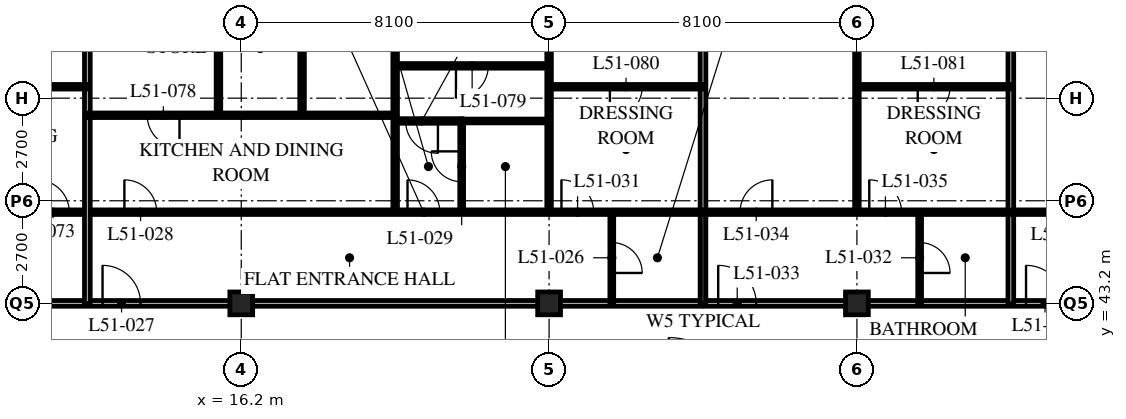
"""IFC4 building model, lengths in metres.
Left out: names, types, materials, properties, quantities, classifications, styles, units other than length and angle.
Written with IfcOpenShell. Run it as: python <this file> out.ifc"""

import sys

from ifc_helpers import new_model, si_unit, direction, frame, frame_2d, origin, origin_2d, place, context, subcontext, project, spatial, rectangle, hollow_rectangle, extrude, element, fill, save


model = new_model("IFC4")
c1 = context("Model", 3, precision=1e-05, world=origin(), true_north=direction((0.0, 1.0)))
c2 = subcontext(c1, "Body", "Model", "MODEL_VIEW")
j1 = project(units=[si_unit("LENGTHUNIT", "METRE"), si_unit("PLANEANGLEUNIT", "RADIAN")], contexts=[c1])
p1 = place(None, origin())
s1 = spatial("IfcSite", under=j1, at=p1, CompositionType="ELEMENT")
p2 = place(p1, origin())
s2 = spatial("IfcBuilding", under=s1, at=p2, CompositionType="ELEMENT")
p3 = place(p2, frame((0.0, 0.0, 199.2)))
s3 = spatial("IfcBuildingStorey", under=s2, at=p3, CompositionType="ELEMENT", Elevation=199.2)
for number, where, z_axis, x_axis in (
    (1, (16.2, 43.2, 0.0), (0.0, 0.0, 1.0), (1.0, 0.0, 0.0)),
    (2, (24.3, 43.2, 0.0), (0.0, 0.0, 1.0), (1.0, 0.0, 0.0)),
    (3, (32.4, 43.2, 0.0), (0.0, 0.0, 1.0), (1.0, 0.0, 0.0)),
):
    element("IfcColumn", number, at=place(p3, frame(where, z_axis=z_axis, x_axis=x_axis)), inside=s3, PredefinedType="COLUMN", context=c2, shape_type="SweptSolid", body=[
        extrude(hollow_rectangle(XDim=0.6, YDim=0.6, WallThickness=0.05, at=origin_2d()), origin(), (0.0, 0.0, 1.0), 3.6),
    ])
p4 = place(p3, frame((8.1, 43.2, 0.0), z_axis=(0.0, 0.0, 1.0), x_axis=(1.0, 0.0, 0.0)))
e4 = element("IfcWall", 4, at=p4, inside=s3, PredefinedType="PARTITIONING", context=c2, shape_type="SweptSolid", body=[
    extrude(rectangle(XDim=40.5, YDim=0.15, at=frame_2d((20.25, 0.0))), origin(), (0.0, 0.0, 1.0), 2.778),
])
p5 = place(p4, frame((4.45, 0.0, 0.0)))
e5 = element("IfcOpeningElement", 5, at=p5, cuts=e4, PredefinedType="OPENING", context=c2, shape_type="SweptSolid", body=[
    extrude(rectangle(XDim=1.0, YDim=2.1, at=frame_2d((0.5, 1.05))), frame((0.0, 0.085, 0.0), z_axis=(0.0, -1.0, 0.0), x_axis=(1.0, 0.0, 0.0)), (0.0, 0.0, 1.0), 0.17),
])
p6 = place(p4, frame((20.65, 0.0, 0.0)))
e6 = element("IfcOpeningElement", 6, at=p6, cuts=e4, PredefinedType="OPENING", context=c2, shape_type="SweptSolid", body=[
    extrude(rectangle(XDim=1.0, YDim=2.1, at=frame_2d((0.5, 1.05))), frame((0.0, 0.085, 0.0), z_axis=(0.0, -1.0, 0.0), x_axis=(1.0, 0.0, 0.0)), (0.0, 0.0, 1.0), 0.17),
])
p7 = place(p4, frame((28.75, 0.0, 0.0)))
e7 = element("IfcOpeningElement", 7, at=p7, cuts=e4, PredefinedType="OPENING", context=c2, shape_type="SweptSolid", body=[
    extrude(rectangle(XDim=1.0, YDim=2.1, at=frame_2d((0.5, 1.05))), frame((0.0, 0.085, 0.0), z_axis=(0.0, -1.0, 0.0), x_axis=(1.0, 0.0, 0.0)), (0.0, 0.0, 1.0), 0.17),
])
p8 = place(p4, frame((37.975, 0.0, 0.0)))
e8 = element("IfcOpeningElement", 8, at=p8, cuts=e4, PredefinedType="OPENING", context=c2, shape_type="SweptSolid", body=[
    extrude(rectangle(XDim=1.0, YDim=2.1, at=frame_2d((0.5, 1.05))), frame((0.0, 0.085, 0.0), z_axis=(0.0, -1.0, 0.0), x_axis=(1.0, 0.0, 0.0)), (0.0, 0.0, 1.0), 0.17),
])
p9 = place(p4, frame((1.525, 0.0, 0.0)))
e9 = element("IfcOpeningElement", 9, at=p9, cuts=e4, PredefinedType="OPENING", context=c2, shape_type="SweptSolid", body=[
    extrude(rectangle(XDim=1.0, YDim=2.1, at=frame_2d((0.5, 1.05))), frame((0.0, 0.085, 0.0), z_axis=(0.0, -1.0, 0.0), x_axis=(1.0, 0.0, 0.0)), (0.0, 0.0, 1.0), 0.17),
])
p10 = place(p3, frame((25.95, 43.2, 0.0), z_axis=(0.0, 0.0, 1.0), x_axis=(0.0, 1.0, 0.0)))
e10 = element("IfcWall", 10, at=p10, inside=s3, PredefinedType="PARTITIONING", context=c2, shape_type="SweptSolid", body=[
    extrude(rectangle(XDim=2.4, YDim=0.1, at=frame_2d((1.2, 0.0))), origin(), (0.0, 0.0, 1.0), 3.39),
])
p11 = place(p10, frame((0.8, 0.0, 0.0)))
e11 = element("IfcOpeningElement", 11, at=p11, cuts=e10, PredefinedType="OPENING", context=c2, shape_type="SweptSolid", body=[
    extrude(rectangle(XDim=0.8, YDim=2.1, at=frame_2d((0.4, 1.05))), frame((0.0, 0.06, 0.0), z_axis=(0.0, -1.0, 0.0), x_axis=(1.0, 0.0, 0.0)), (0.0, 0.0, 1.0), 0.12),
])
p12 = place(p3, frame((22.0, 45.6, 0.0), z_axis=(0.0, 0.0, 1.0), x_axis=(0.0, 1.0, 0.0)))
e12 = element("IfcWall", 12, at=p12, inside=s3, PredefinedType="PARTITIONING", context=c2, shape_type="SweptSolid", body=[
    extrude(rectangle(XDim=2.4, YDim=0.1, at=frame_2d((1.2, 0.0))), origin(), (0.0, 0.0, 1.0), 3.39),
])
p13 = place(p12, frame((0.8, 0.0, 0.0)))
e13 = element("IfcOpeningElement", 13, at=p13, cuts=e12, PredefinedType="OPENING", context=c2, shape_type="SweptSolid", body=[
    extrude(rectangle(XDim=0.8, YDim=2.1, at=frame_2d((0.4, 1.05))), frame((0.0, 0.06, 0.0), z_axis=(0.0, -1.0, 0.0), x_axis=(1.0, 0.0, 0.0)), (0.0, 0.0, 1.0), 0.12),
])
p14 = place(p3, frame((22.0, 48.0, 0.0), z_axis=(0.0, 0.0, 1.0), x_axis=(1.0, 0.0, 0.0)))
e14 = element("IfcWall", 14, at=p14, inside=s3, PredefinedType="PARTITIONING", context=c2, shape_type="SweptSolid", body=[
    extrude(rectangle(XDim=2.3, YDim=0.1, at=frame_2d((1.15, 0.0))), origin(), (0.0, 0.0, 1.0), 3.39),
])
p15 = place(p3, frame((20.25, 45.6, 0.0), z_axis=(0.0, 0.0, 1.0), x_axis=(0.0, 1.0, 0.0)))
e15 = element("IfcWall", 15, at=p15, inside=s3, PredefinedType="PARTITIONING", context=c2, shape_type="SweptSolid", body=[
    extrude(rectangle(XDim=13.5, YDim=0.12, at=frame_2d((6.75, 0.0))), origin(), (0.0, 0.0, 1.0), 3.39),
])
p16 = place(p3, frame((24.3, 45.6, 0.0), z_axis=(0.0, 0.0, 1.0), x_axis=(0.0, 1.0, 0.0)))
e16 = element("IfcWall", 16, at=p16, inside=s3, PredefinedType="PARTITIONING", context=c2, shape_type="SweptSolid", body=[
    extrude(rectangle(XDim=13.5, YDim=0.12, at=frame_2d((6.75, 0.0))), origin(), (0.0, 0.0, 1.0), 2.778),
])
p17 = place(p3, frame((28.35, 43.2, 0.0), z_axis=(0.0, 0.0, 1.0), x_axis=(0.0, 1.0, 0.0)))
e17 = element("IfcWall", 17, at=p17, inside=s3, PredefinedType="PARTITIONING", context=c2, shape_type="SweptSolid", body=[
    extrude(rectangle(XDim=15.9, YDim=0.15, at=frame_2d((7.95, 0.0))), origin(), (0.0, 0.0, 1.0), 3.39),
])
p18 = place(p3, frame((34.05, 43.2, 0.0), z_axis=(0.0, 0.0, 1.0), x_axis=(0.0, 1.0, 0.0)))
e18 = element("IfcWall", 18, at=p18, inside=s3, PredefinedType="PARTITIONING", context=c2, shape_type="SweptSolid", body=[
    extrude(rectangle(XDim=2.4, YDim=0.1, at=frame_2d((1.2, 0.0))), origin(), (0.0, 0.0, 1.0), 3.39),
])
p19 = place(p18, frame((0.8, 0.0, 0.0)))
e19 = element("IfcOpeningElement", 19, at=p19, cuts=e18, PredefinedType="OPENING", context=c2, shape_type="SweptSolid", body=[
    extrude(rectangle(XDim=0.8, YDim=2.1, at=frame_2d((0.4, 1.05))), frame((0.0, 0.06, 0.0), z_axis=(0.0, -1.0, 0.0), x_axis=(1.0, 0.0, 0.0)), (0.0, 0.0, 1.0), 0.12),
])
p20 = place(p3, frame((32.4, 45.6, 0.0), z_axis=(0.0, 0.0, 1.0), x_axis=(0.0, 1.0, 0.0)))
e20 = element("IfcWall", 20, at=p20, inside=s3, PredefinedType="PARTITIONING", context=c2, shape_type="SweptSolid", body=[
    extrude(rectangle(XDim=13.5, YDim=0.12, at=frame_2d((6.75, 0.0))), origin(), (0.0, 0.0, 1.0), 2.778),
])
p21 = place(p3, frame((36.45, 43.2, 0.0), z_axis=(0.0, 0.0, 1.0), x_axis=(0.0, 1.0, 0.0)))
e21 = element("IfcWall", 21, at=p21, inside=s3, PredefinedType="PARTITIONING", context=c2, shape_type="SweptSolid", body=[
    extrude(rectangle(XDim=15.9, YDim=0.15, at=frame_2d((7.95, 0.0))), origin(), (0.0, 0.0, 1.0), 3.39),
])
p22 = place(p3, frame((4.1, 45.6, 0.0), z_axis=(0.0, 0.0, 1.0), x_axis=(1.0, 0.0, 0.0)))
e22 = element("IfcWall", 22, at=p22, inside=s3, PredefinedType="PARTITIONING", context=c2, shape_type="SweptSolid", body=[
    extrude(rectangle(XDim=48.5, YDim=0.12, at=frame_2d((24.25, 0.0))), origin(), (0.0, 0.0, 1.0), 3.39),
])
p23 = place(p22, frame((9.025, 0.0, 0.0)))
e23 = element("IfcOpeningElement", 23, at=p23, cuts=e22, PredefinedType="OPENING", context=c2, shape_type="SweptSolid", body=[
    extrude(rectangle(XDim=0.85, YDim=2.1, at=frame_2d((0.425, 1.05))), frame((0.0, 0.07, 0.0), z_axis=(0.0, -1.0, 0.0), x_axis=(1.0, 0.0, 0.0)), (0.0, 0.0, 1.0), 0.14),
])
p24 = place(p22, frame((16.475, 0.0, 0.0)))
e24 = element("IfcOpeningElement", 24, at=p24, cuts=e22, PredefinedType="OPENING", context=c2, shape_type="SweptSolid", body=[
    extrude(rectangle(XDim=0.85, YDim=2.1, at=frame_2d((0.425, 1.05))), frame((0.0, 0.07, 0.0), z_axis=(0.0, -1.0, 0.0), x_axis=(1.0, 0.0, 0.0)), (0.0, 0.0, 1.0), 0.14),
])
p25 = place(p22, frame((20.525, 0.0, 0.0)))
e25 = element("IfcOpeningElement", 25, at=p25, cuts=e22, PredefinedType="OPENING", context=c2, shape_type="SweptSolid", body=[
    extrude(rectangle(XDim=0.85, YDim=2.1, at=frame_2d((0.425, 1.05))), frame((0.0, 0.07, 0.0), z_axis=(0.0, -1.0, 0.0), x_axis=(1.0, 0.0, 0.0)), (0.0, 0.0, 1.0), 0.14),
])
p26 = place(p22, frame((25.225, 0.0, 0.0)))
e26 = element("IfcOpeningElement", 26, at=p26, cuts=e22, PredefinedType="OPENING", context=c2, shape_type="SweptSolid", body=[
    extrude(rectangle(XDim=0.85, YDim=2.1, at=frame_2d((0.425, 1.05))), frame((0.0, 0.07, 0.0), z_axis=(0.0, -1.0, 0.0), x_axis=(1.0, 0.0, 0.0)), (0.0, 0.0, 1.0), 0.14),
])
p27 = place(p22, frame((28.625, 0.0, 0.0)))
e27 = element("IfcOpeningElement", 27, at=p27, cuts=e22, PredefinedType="OPENING", context=c2, shape_type="SweptSolid", body=[
    extrude(rectangle(XDim=0.85, YDim=2.1, at=frame_2d((0.425, 1.05))), frame((0.0, 0.07, 0.0), z_axis=(0.0, -1.0, 0.0), x_axis=(1.0, 0.0, 0.0)), (0.0, 0.0, 1.0), 0.14),
])
p28 = place(p22, frame((33.325, 0.0, 0.0)))
e28 = element("IfcOpeningElement", 28, at=p28, cuts=e22, PredefinedType="OPENING", context=c2, shape_type="SweptSolid", body=[
    extrude(rectangle(XDim=0.85, YDim=2.1, at=frame_2d((0.425, 1.05))), frame((0.0, 0.07, 0.0), z_axis=(0.0, -1.0, 0.0), x_axis=(1.0, 0.0, 0.0)), (0.0, 0.0, 1.0), 0.14),
])
p29 = place(p22, frame((36.725, 0.0, 0.0)))
e29 = element("IfcOpeningElement", 29, at=p29, cuts=e22, PredefinedType="OPENING", context=c2, shape_type="SweptSolid", body=[
    extrude(rectangle(XDim=0.85, YDim=2.1, at=frame_2d((0.425, 1.05))), frame((0.0, 0.07, 0.0), z_axis=(0.0, -1.0, 0.0), x_axis=(1.0, 0.0, 0.0)), (0.0, 0.0, 1.0), 0.14),
])
p30 = place(p22, frame((40.925, 0.0, 0.0)))
e30 = element("IfcOpeningElement", 30, at=p30, cuts=e22, PredefinedType="OPENING", context=c2, shape_type="SweptSolid", body=[
    extrude(rectangle(XDim=0.85, YDim=2.1, at=frame_2d((0.425, 1.05))), frame((0.0, 0.07, 0.0), z_axis=(0.0, -1.0, 0.0), x_axis=(1.0, 0.0, 0.0)), (0.0, 0.0, 1.0), 0.14),
])
p31 = place(p22, frame((44.775, 0.0, 0.0)))
e31 = element("IfcOpeningElement", 31, at=p31, cuts=e22, PredefinedType="OPENING", context=c2, shape_type="SweptSolid", body=[
    extrude(rectangle(XDim=0.85, YDim=2.1, at=frame_2d((0.425, 1.05))), frame((0.0, 0.07, 0.0), z_axis=(0.0, -1.0, 0.0), x_axis=(1.0, 0.0, 0.0)), (0.0, 0.0, 1.0), 0.14),
])
p32 = place(p22, frame((6.725, 0.0, 0.0)))
e32 = element("IfcOpeningElement", 32, at=p32, cuts=e22, PredefinedType="OPENING", context=c2, shape_type="SweptSolid", body=[
    extrude(rectangle(XDim=0.85, YDim=2.1, at=frame_2d((0.425, 1.05))), frame((0.0, 0.07, 0.0), z_axis=(0.0, -1.0, 0.0), x_axis=(1.0, 0.0, 0.0)), (0.0, 0.0, 1.0), 0.14),
])
p33 = place(p22, frame((2.875, 0.0, 0.0)))
e33 = element("IfcOpeningElement", 33, at=p33, cuts=e22, PredefinedType="OPENING", context=c2, shape_type="SweptSolid", body=[
    extrude(rectangle(XDim=0.85, YDim=2.1, at=frame_2d((0.425, 1.05))), frame((0.0, 0.07, 0.0), z_axis=(0.0, -1.0, 0.0), x_axis=(1.0, 0.0, 0.0)), (0.0, 0.0, 1.0), 0.14),
])
p34 = place(p3, frame((12.15, 43.2, 0.0), z_axis=(0.0, 0.0, 1.0), x_axis=(0.0, 1.0, 0.0)))
e34 = element("IfcWall", 34, at=p34, inside=s3, PredefinedType="PARTITIONING", context=c2, shape_type="SweptSolid", body=[
    extrude(rectangle(XDim=15.9, YDim=0.15, at=frame_2d((7.95, 0.0))), origin(), (0.0, 0.0, 1.0), 3.39),
])
p35 = place(p3, frame((20.25, 48.0, 0.0), z_axis=(0.0, 0.0, 1.0), x_axis=(1.0, 0.0, 0.0)))
e35 = element("IfcWall", 35, at=p35, inside=s3, PredefinedType="PARTITIONING", context=c2, shape_type="SweptSolid", body=[
    extrude(rectangle(XDim=1.76, YDim=0.12, at=frame_2d((0.88, 0.0))), origin(), (0.0, 0.0, 1.0), 3.39),
])
p36 = place(p35, frame((0.275, 0.0, 0.0)))
e36 = element("IfcOpeningElement", 36, at=p36, cuts=e35, PredefinedType="OPENING", context=c2, shape_type="SweptSolid", body=[
    extrude(rectangle(XDim=0.85, YDim=2.1, at=frame_2d((0.425, 1.05))), frame((0.0, 0.07, 0.0), z_axis=(0.0, -1.0, 0.0), x_axis=(1.0, 0.0, 0.0)), (0.0, 0.0, 1.0), 0.14),
])
p37 = place(p3, frame((12.15, 48.15, 0.0), z_axis=(0.0, 0.0, 1.0), x_axis=(1.0, 0.0, 0.0)))
e37 = element("IfcWall", 37, at=p37, inside=s3, PredefinedType="PARTITIONING", context=c2, shape_type="SweptSolid", body=[
    extrude(rectangle(XDim=8.1, YDim=0.12, at=frame_2d((4.05, 0.0))), origin(), (0.0, 0.0, 1.0), 3.39),
])
p38 = place(p37, frame((1.575, 0.0, 0.0)))
e38 = element("IfcOpeningElement", 38, at=p38, cuts=e37, PredefinedType="OPENING", context=c2, shape_type="SweptSolid", body=[
    extrude(rectangle(XDim=0.85, YDim=2.1, at=frame_2d((0.425, 1.05))), frame((0.0, 0.07, 0.0), z_axis=(0.0, -1.0, 0.0), x_axis=(1.0, 0.0, 0.0)), (0.0, 0.0, 1.0), 0.14),
])
p39 = place(p3, frame((20.25, 49.45, 0.0), z_axis=(0.0, 0.0, 1.0), x_axis=(1.0, 0.0, 0.0)))
e39 = element("IfcWall", 39, at=p39, inside=s3, PredefinedType="PARTITIONING", context=c2, shape_type="SweptSolid", body=[
    extrude(rectangle(XDim=4.05, YDim=0.12, at=frame_2d((2.025, 0.0))), origin(), (0.0, 0.0, 1.0), 3.39),
])
p40 = place(p39, frame((1.6, 0.0, 0.0)))
e40 = element("IfcOpeningElement", 40, at=p40, cuts=e39, PredefinedType="OPENING", context=c2, shape_type="SweptSolid", body=[
    extrude(rectangle(XDim=0.85, YDim=2.1, at=frame_2d((0.425, 1.05))), frame((0.0, 0.07, 0.0), z_axis=(0.0, -1.0, 0.0), x_axis=(1.0, 0.0, 0.0)), (0.0, 0.0, 1.0), 0.14),
])
p41 = place(p3, frame((24.3, 48.9, 0.0), z_axis=(0.0, 0.0, 1.0), x_axis=(1.0, 0.0, 0.0)))
e41 = element("IfcWall", 41, at=p41, inside=s3, PredefinedType="PARTITIONING", context=c2, shape_type="SweptSolid", body=[
    extrude(rectangle(XDim=4.05, YDim=0.12, at=frame_2d((2.025, 0.0))), origin(), (0.0, 0.0, 1.0), 3.39),
])
p42 = place(p41, frame((1.6, 0.0, 0.0)))
e42 = element("IfcOpeningElement", 42, at=p42, cuts=e41, PredefinedType="OPENING", context=c2, shape_type="SweptSolid", body=[
    extrude(rectangle(XDim=0.85, YDim=2.1, at=frame_2d((0.425, 1.05))), frame((0.0, 0.07, 0.0), z_axis=(0.0, -1.0, 0.0), x_axis=(1.0, 0.0, 0.0)), (0.0, 0.0, 1.0), 0.14),
])
p43 = place(p3, frame((32.4, 48.9, 0.0), z_axis=(0.0, 0.0, 1.0), x_axis=(1.0, 0.0, 0.0)))
e43 = element("IfcWall", 43, at=p43, inside=s3, PredefinedType="PARTITIONING", context=c2, shape_type="SweptSolid", body=[
    extrude(rectangle(XDim=4.05, YDim=0.12, at=frame_2d((2.025, 0.0))), origin(), (0.0, 0.0, 1.0), 3.39),
])
p44 = place(p43, frame((1.6, 0.0, 0.0)))
e44 = element("IfcOpeningElement", 44, at=p44, cuts=e43, PredefinedType="OPENING", context=c2, shape_type="SweptSolid", body=[
    extrude(rectangle(XDim=0.85, YDim=2.1, at=frame_2d((0.425, 1.05))), frame((0.0, 0.07, 0.0), z_axis=(0.0, -1.0, 0.0), x_axis=(1.0, 0.0, 0.0)), (0.0, 0.0, 1.0), 0.14),
])
p45 = place(p3, frame((8.1, 48.9, 0.0), z_axis=(0.0, 0.0, 1.0), x_axis=(1.0, 0.0, 0.0)))
e45 = element("IfcWall", 45, at=p45, inside=s3, PredefinedType="PARTITIONING", context=c2, shape_type="SweptSolid", body=[
    extrude(rectangle(XDim=4.05, YDim=0.12, at=frame_2d((2.025, 0.0))), origin(), (0.0, 0.0, 1.0), 3.39),
])
p46 = place(p45, frame((1.6, 0.0, 0.0)))
e46 = element("IfcOpeningElement", 46, at=p46, cuts=e45, PredefinedType="OPENING", context=c2, shape_type="SweptSolid", body=[
    extrude(rectangle(XDim=0.85, YDim=2.1, at=frame_2d((0.425, 1.05))), frame((0.0, 0.07, 0.0), z_axis=(0.0, -1.0, 0.0), x_axis=(1.0, 0.0, 0.0)), (0.0, 0.0, 1.0), 0.14),
])
for number, where, z_axis, x_axis in (
    (47, (15.6, 48.15, 0.0), (0.0, 0.0, 1.0), (0.0, 1.0, 0.0)),
    (48, (17.8, 48.15, 0.0), (0.0, 0.0, 1.0), (0.0, 1.0, 0.0)),
):
    element("IfcWall", number, at=place(p3, frame(where, z_axis=z_axis, x_axis=x_axis)), inside=s3, PredefinedType="PARTITIONING", context=c2, shape_type="SweptSolid", body=[
        extrude(rectangle(XDim=3.51, YDim=0.12, at=frame_2d((1.755, 0.0))), origin(), (0.0, 0.0, 1.0), 3.39),
    ])
p47 = place(p11, origin())
e49 = element("IfcDoor", 49, at=p47, inside=s3, OperationType="SINGLE_SWING_RIGHT", PredefinedType="DOOR", context=c2, shape_type="SweptSolid", body=[
    extrude(rectangle(XDim=0.8, YDim=2.1, at=frame_2d((0.4, 1.05))), frame((0.0, 0.025, 0.0), z_axis=(0.0, -1.0, 0.0), x_axis=(1.0, 0.0, 0.0)), (0.0, 0.0, 1.0), 0.05),
])
fill(e11, e49)
p48 = place(p5, origin())
e50 = element("IfcDoor", 50, at=p48, inside=s3, OperationType="SINGLE_SWING_LEFT", PredefinedType="DOOR", context=c2, shape_type="SweptSolid", body=[
    extrude(rectangle(XDim=1.0, YDim=2.1, at=frame_2d((0.5, 1.05))), frame((0.0, 0.025, 0.0), z_axis=(0.0, -1.0, 0.0), x_axis=(1.0, 0.0, 0.0)), (0.0, 0.0, 1.0), 0.05),
])
fill(e5, e50)
p49 = place(p23, origin())
e51 = element("IfcDoor", 51, at=p49, inside=s3, OperationType="SINGLE_SWING_LEFT", PredefinedType="DOOR", context=c2, shape_type="SweptSolid", body=[
    extrude(rectangle(XDim=0.85, YDim=2.1, at=frame_2d((0.425, 1.05))), frame((0.0, 0.025, 0.0), z_axis=(0.0, -1.0, 0.0), x_axis=(1.0, 0.0, 0.0)), (0.0, 0.0, 1.0), 0.05),
])
fill(e23, e51)
p50 = place(p13, origin())
e52 = element("IfcDoor", 52, at=p50, inside=s3, OperationType="SINGLE_SWING_RIGHT", PredefinedType="DOOR", context=c2, shape_type="SweptSolid", body=[
    extrude(rectangle(XDim=0.8, YDim=2.1, at=frame_2d((0.4, 1.05))), frame((0.0, 0.025, 0.0), z_axis=(0.0, -1.0, 0.0), x_axis=(1.0, 0.0, 0.0)), (0.0, 0.0, 1.0), 0.05),
])
fill(e13, e52)
p51 = place(p24, origin())
e53 = element("IfcDoor", 53, at=p51, inside=s3, OperationType="SINGLE_SWING_LEFT", PredefinedType="DOOR", context=c2, shape_type="SweptSolid", body=[
    extrude(rectangle(XDim=0.85, YDim=2.1, at=frame_2d((0.425, 1.05))), frame((0.0, 0.025, 0.0), z_axis=(0.0, -1.0, 0.0), x_axis=(1.0, 0.0, 0.0)), (0.0, 0.0, 1.0), 0.05),
])
fill(e24, e53)
p52 = place(p25, origin())
e54 = element("IfcDoor", 54, at=p52, inside=s3, OperationType="SINGLE_SWING_LEFT", PredefinedType="DOOR", context=c2, shape_type="SweptSolid", body=[
    extrude(rectangle(XDim=0.85, YDim=2.1, at=frame_2d((0.425, 1.05))), frame((0.0, 0.025, 0.0), z_axis=(0.0, -1.0, 0.0), x_axis=(1.0, 0.0, 0.0)), (0.0, 0.0, 1.0), 0.05),
])
fill(e25, e54)
p53 = place(p19, origin())
e55 = element("IfcDoor", 55, at=p53, inside=s3, OperationType="SINGLE_SWING_RIGHT", PredefinedType="DOOR", context=c2, shape_type="SweptSolid", body=[
    extrude(rectangle(XDim=0.8, YDim=2.1, at=frame_2d((0.4, 1.05))), frame((0.0, 0.025, 0.0), z_axis=(0.0, -1.0, 0.0), x_axis=(1.0, 0.0, 0.0)), (0.0, 0.0, 1.0), 0.05),
])
fill(e19, e55)
p54 = place(p6, origin())
e56 = element("IfcDoor", 56, at=p54, inside=s3, OperationType="SINGLE_SWING_LEFT", PredefinedType="DOOR", context=c2, shape_type="SweptSolid", body=[
    extrude(rectangle(XDim=1.0, YDim=2.1, at=frame_2d((0.5, 1.05))), frame((0.0, 0.025, 0.0), z_axis=(0.0, -1.0, 0.0), x_axis=(1.0, 0.0, 0.0)), (0.0, 0.0, 1.0), 0.05),
])
fill(e6, e56)
p55 = place(p26, origin())
e57 = element("IfcDoor", 57, at=p55, inside=s3, OperationType="SINGLE_SWING_RIGHT", PredefinedType="DOOR", context=c2, shape_type="SweptSolid", body=[
    extrude(rectangle(XDim=0.85, YDim=2.1, at=frame_2d((0.425, 1.05))), frame((0.0, 0.025, 0.0), z_axis=(0.0, -1.0, 0.0), x_axis=(1.0, 0.0, 0.0)), (0.0, 0.0, 1.0), 0.05),
])
fill(e26, e57)
p56 = place(p27, origin())
e58 = element("IfcDoor", 58, at=p56, inside=s3, OperationType="SINGLE_SWING_LEFT", PredefinedType="DOOR", context=c2, shape_type="SweptSolid", body=[
    extrude(rectangle(XDim=0.85, YDim=2.1, at=frame_2d((0.425, 1.05))), frame((0.0, 0.025, 0.0), z_axis=(0.0, -1.0, 0.0), x_axis=(1.0, 0.0, 0.0)), (0.0, 0.0, 1.0), 0.05),
])
fill(e27, e58)
p57 = place(p7, origin())
e59 = element("IfcDoor", 59, at=p57, inside=s3, OperationType="SINGLE_SWING_LEFT", PredefinedType="DOOR", context=c2, shape_type="SweptSolid", body=[
    extrude(rectangle(XDim=1.0, YDim=2.1, at=frame_2d((0.5, 1.05))), frame((0.0, 0.025, 0.0), z_axis=(0.0, -1.0, 0.0), x_axis=(1.0, 0.0, 0.0)), (0.0, 0.0, 1.0), 0.05),
])
fill(e7, e59)
p58 = place(p32, origin())
e60 = element("IfcDoor", 60, at=p58, inside=s3, OperationType="SINGLE_SWING_LEFT", PredefinedType="DOOR", context=c2, shape_type="SweptSolid", body=[
    extrude(rectangle(XDim=0.85, YDim=2.1, at=frame_2d((0.425, 1.05))), frame((0.0, 0.025, 0.0), z_axis=(0.0, -1.0, 0.0), x_axis=(1.0, 0.0, 0.0)), (0.0, 0.0, 1.0), 0.05),
])
fill(e32, e60)
p59 = place(p36, origin())
e61 = element("IfcDoor", 61, at=p59, inside=s3, OperationType="SINGLE_SWING_LEFT", PredefinedType="DOOR", context=c2, shape_type="SweptSolid", body=[
    extrude(rectangle(XDim=0.85, YDim=2.1, at=frame_2d((0.425, 1.05))), frame((0.0, 0.025, 0.0), z_axis=(0.0, -1.0, 0.0), x_axis=(1.0, 0.0, 0.0)), (0.0, 0.0, 1.0), 0.05),
])
fill(e36, e61)
p60 = place(p38, origin())
e62 = element("IfcDoor", 62, at=p60, inside=s3, OperationType="SINGLE_SWING_LEFT", PredefinedType="DOOR", context=c2, shape_type="SweptSolid", body=[
    extrude(rectangle(XDim=0.85, YDim=2.1, at=frame_2d((0.425, 1.05))), frame((0.0, 0.025, 0.0), z_axis=(0.0, -1.0, 0.0), x_axis=(1.0, 0.0, 0.0)), (0.0, 0.0, 1.0), 0.05),
])
fill(e38, e62)
p61 = place(p40, origin())
e63 = element("IfcDoor", 63, at=p61, inside=s3, OperationType="SINGLE_SWING_RIGHT", PredefinedType="DOOR", context=c2, shape_type="SweptSolid", body=[
    extrude(rectangle(XDim=0.85, YDim=2.1, at=frame_2d((0.425, 1.05))), frame((0.0, 0.025, 0.0), z_axis=(0.0, -1.0, 0.0), x_axis=(1.0, 0.0, 0.0)), (0.0, 0.0, 1.0), 0.05),
])
fill(e40, e63)
p62 = place(p42, origin())
e64 = element("IfcDoor", 64, at=p62, inside=s3, OperationType="SINGLE_SWING_RIGHT", PredefinedType="DOOR", context=c2, shape_type="SweptSolid", body=[
    extrude(rectangle(XDim=0.85, YDim=2.1, at=frame_2d((0.425, 1.05))), frame((0.0, 0.025, 0.0), z_axis=(0.0, -1.0, 0.0), x_axis=(1.0, 0.0, 0.0)), (0.0, 0.0, 1.0), 0.05),
])
fill(e42, e64)
p63 = place(p44, origin())
e65 = element("IfcDoor", 65, at=p63, inside=s3, OperationType="SINGLE_SWING_RIGHT", PredefinedType="DOOR", context=c2, shape_type="SweptSolid", body=[
    extrude(rectangle(XDim=0.85, YDim=2.1, at=frame_2d((0.425, 1.05))), frame((0.0, 0.025, 0.0), z_axis=(0.0, -1.0, 0.0), x_axis=(1.0, 0.0, 0.0)), (0.0, 0.0, 1.0), 0.05),
])
fill(e44, e65)
save(model, sys.argv[1])
